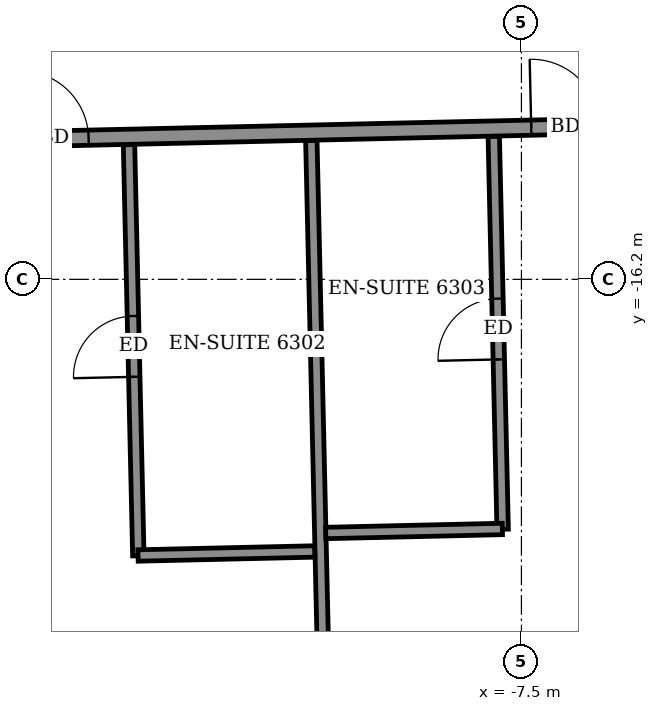
"""IFC4 building model, lengths in metres.
Left out: names, types, materials, properties, quantities, classifications, styles, units other than length and angle.
Written with IfcOpenShell. Run it as: python <this file> out.ifc"""

import sys

from ifc_helpers import new_model, si_unit, direction, frame, frame_2d, origin, place, context, subcontext, project, spatial, rectangle, extrude, element, fill, save


model = new_model("IFC4")
c1 = context("Model", 3, precision=1e-05, world=origin(), true_north=direction((0.0, 1.0)))
c2 = subcontext(c1, "Body", "Model", "MODEL_VIEW")
j1 = project(units=[si_unit("LENGTHUNIT", "METRE"), si_unit("PLANEANGLEUNIT", "RADIAN")], contexts=[c1])
p1 = place(None, origin())
s1 = spatial("IfcSite", under=j1, at=p1, CompositionType="ELEMENT")
p2 = place(p1, origin())
s2 = spatial("IfcBuilding", under=s1, at=p2, CompositionType="ELEMENT")
p3 = place(p2, frame((0.0, 0.0, 249.1)))
s3 = spatial("IfcBuildingStorey", under=s2, at=p3, CompositionType="ELEMENT", Elevation=249.1)
p4 = place(p3, frame((-10.005, -25.747, 0.0), z_axis=(0.0, 0.0, 1.0), x_axis=(-0.022770155219, 0.999740726404, 0.0)))
e1 = element("IfcWall", 1, at=p4, inside=s3, PredefinedType="PARTITIONING", context=c2, shape_type="SweptSolid", body=[
    extrude(rectangle(XDim=11.376, YDim=0.15, at=frame_2d((5.688, 0.0))), origin(), (0.0, 0.0, 1.0), 2.5),
])
p5 = place(p3, frame((-12.54, -19.837, 0.0), z_axis=(0.0, 0.0, 1.0), x_axis=(-0.022742931096, 0.999741346092, 0.0)))
e2 = element("IfcWall", 2, at=p5, inside=s3, PredefinedType="PARTITIONING", context=c2, shape_type="SweptSolid", body=[
    extrude(rectangle(XDim=5.41, YDim=0.15, at=frame_2d((2.705, 0.0))), origin(), (0.0, 0.0, 1.0), 3.05),
])
p6 = place(p5, frame((2.355, 0.0, 0.0)))
e3 = element("IfcOpeningElement", 3, at=p6, cuts=e2, PredefinedType="OPENING", context=c2, shape_type="SweptSolid", body=[
    extrude(rectangle(XDim=0.8, YDim=2.1, at=frame_2d((0.4, 1.05))), frame((0.0, 0.085, 0.0), z_axis=(0.0, -1.0, 0.0), x_axis=(1.0, 0.0, 0.0)), (0.0, 0.0, 1.0), 0.17),
])
p7 = place(p3, frame((-12.544, -19.833, 0.0), z_axis=(0.0, 0.0, 1.0), x_axis=(0.999740260747, 0.02279059109, 0.0)))
e4 = element("IfcWall", 4, at=p7, inside=s3, PredefinedType="PARTITIONING", context=c2, shape_type="SweptSolid", body=[
    extrude(rectangle(XDim=2.324, YDim=0.15, at=frame_2d((1.162, 0.0))), origin(), (0.0, 0.0, 1.0), 3.05),
])
p8 = place(p3, frame((-7.747, -19.488, 0.0), z_axis=(0.0, 0.0, 1.0), x_axis=(-0.022618432726, 0.999744170526, 0.0)))
e5 = element("IfcWall", 5, at=p8, inside=s3, PredefinedType="PARTITIONING", context=c2, shape_type="SweptSolid", body=[
    extrude(rectangle(XDim=5.17, YDim=0.15, at=frame_2d((2.585, 0.0))), origin(), (0.0, 0.0, 1.0), 3.05),
])
p9 = place(p8, frame((2.235, 0.0, 0.0)))
e6 = element("IfcOpeningElement", 6, at=p9, cuts=e5, PredefinedType="OPENING", context=c2, shape_type="SweptSolid", body=[
    extrude(rectangle(XDim=0.8, YDim=2.1, at=frame_2d((0.4, 1.05))), frame((0.0, 0.085, 0.0), z_axis=(0.0, -1.0, 0.0), x_axis=(1.0, 0.0, 0.0)), (0.0, 0.0, 1.0), 0.17),
])
p10 = place(p3, frame((-10.075, -19.537, 0.0), z_axis=(0.0, 0.0, 1.0), x_axis=(0.999737862264, 0.022895561926, 0.0)))
e7 = element("IfcWall", 7, at=p10, inside=s3, PredefinedType="PARTITIONING", context=c2, shape_type="SweptSolid", body=[
    extrude(rectangle(XDim=2.324, YDim=0.15, at=frame_2d((1.162, 0.0))), origin(), (0.0, 0.0, 1.0), 3.05),
])
p11 = place(p3, frame((-27.016, -14.65, 0.0), z_axis=(0.0, 0.0, 1.0), x_axis=(0.999742874861, 0.022675629315, 0.0)))
e8 = element("IfcWall", 8, at=p11, inside=s3, PredefinedType="PARTITIONING", context=c2, shape_type="SweptSolid", body=[
    extrude(rectangle(XDim=50.883, YDim=0.2, at=frame_2d((25.442, 0.0))), origin(), (0.0, 0.0, 1.0), 3.05),
])
p12 = place(p11, frame((1.575, 0.0, 0.0)))
e9 = element("IfcOpeningElement", 9, at=p12, cuts=e8, PredefinedType="OPENING", context=c2, shape_type="SweptSolid", body=[
    extrude(rectangle(XDim=1.0, YDim=2.1, at=frame_2d((0.5, 1.05))), frame((0.0, 0.11, 0.0), z_axis=(0.0, -1.0, 0.0), x_axis=(1.0, 0.0, 0.0)), (0.0, 0.0, 1.0), 0.22),
])
p13 = place(p11, frame((6.4, 0.0, 0.0)))
e10 = element("IfcOpeningElement", 10, at=p13, cuts=e8, PredefinedType="OPENING", context=c2, shape_type="SweptSolid", body=[
    extrude(rectangle(XDim=0.9, YDim=2.1, at=frame_2d((0.45, 1.05))), frame((0.0, 0.11, 0.0), z_axis=(0.0, -1.0, 0.0), x_axis=(1.0, 0.0, 0.0)), (0.0, 0.0, 1.0), 0.22),
])
p14 = place(p11, frame((11.025, 0.0, 0.0)))
e11 = element("IfcOpeningElement", 11, at=p14, cuts=e8, PredefinedType="OPENING", context=c2, shape_type="SweptSolid", body=[
    extrude(rectangle(XDim=0.9, YDim=2.1, at=frame_2d((0.45, 1.05))), frame((0.0, 0.11, 0.0), z_axis=(0.0, -1.0, 0.0), x_axis=(1.0, 0.0, 0.0)), (0.0, 0.0, 1.0), 0.22),
])
p15 = place(p11, frame((12.925, 0.0, 0.0)))
e12 = element("IfcOpeningElement", 12, at=p15, cuts=e8, PredefinedType="OPENING", context=c2, shape_type="SweptSolid", body=[
    extrude(rectangle(XDim=0.9, YDim=2.1, at=frame_2d((0.45, 1.05))), frame((0.0, 0.11, 0.0), z_axis=(0.0, -1.0, 0.0), x_axis=(1.0, 0.0, 0.0)), (0.0, 0.0, 1.0), 0.22),
])
p16 = place(p11, frame((19.65, 0.0, 0.0)))
e13 = element("IfcOpeningElement", 13, at=p16, cuts=e8, PredefinedType="OPENING", context=c2, shape_type="SweptSolid", body=[
    extrude(rectangle(XDim=0.9, YDim=2.1, at=frame_2d((0.45, 1.05))), frame((0.0, 0.11, 0.0), z_axis=(0.0, -1.0, 0.0), x_axis=(1.0, 0.0, 0.0)), (0.0, 0.0, 1.0), 0.22),
])
p17 = place(p11, frame((21.575, 0.0, 0.0)))
e14 = element("IfcOpeningElement", 14, at=p17, cuts=e8, PredefinedType="OPENING", context=c2, shape_type="SweptSolid", body=[
    extrude(rectangle(XDim=0.9, YDim=2.1, at=frame_2d((0.45, 1.05))), frame((0.0, 0.11, 0.0), z_axis=(0.0, -1.0, 0.0), x_axis=(1.0, 0.0, 0.0)), (0.0, 0.0, 1.0), 0.22),
])
p18 = place(p11, frame((28.25, 0.0, 0.0)))
e15 = element("IfcOpeningElement", 15, at=p18, cuts=e8, PredefinedType="OPENING", context=c2, shape_type="SweptSolid", body=[
    extrude(rectangle(XDim=0.9, YDim=2.1, at=frame_2d((0.45, 1.05))), frame((0.0, 0.11, 0.0), z_axis=(0.0, -1.0, 0.0), x_axis=(1.0, 0.0, 0.0)), (0.0, 0.0, 1.0), 0.22),
])
p19 = place(p11, frame((30.125, 0.0, 0.0)))
e16 = element("IfcOpeningElement", 16, at=p19, cuts=e8, PredefinedType="OPENING", context=c2, shape_type="SweptSolid", body=[
    extrude(rectangle(XDim=0.9, YDim=2.1, at=frame_2d((0.45, 1.05))), frame((0.0, 0.11, 0.0), z_axis=(0.0, -1.0, 0.0), x_axis=(1.0, 0.0, 0.0)), (0.0, 0.0, 1.0), 0.22),
])
p20 = place(p11, frame((36.9, 0.0, 0.0)))
e17 = element("IfcOpeningElement", 17, at=p20, cuts=e8, PredefinedType="OPENING", context=c2, shape_type="SweptSolid", body=[
    extrude(rectangle(XDim=0.9, YDim=2.1, at=frame_2d((0.45, 1.05))), frame((0.0, 0.11, 0.0), z_axis=(0.0, -1.0, 0.0), x_axis=(1.0, 0.0, 0.0)), (0.0, 0.0, 1.0), 0.22),
])
p21 = place(p11, frame((38.85, 0.0, 0.0)))
e18 = element("IfcOpeningElement", 18, at=p21, cuts=e8, PredefinedType="OPENING", context=c2, shape_type="SweptSolid", body=[
    extrude(rectangle(XDim=0.9, YDim=2.1, at=frame_2d((0.45, 1.05))), frame((0.0, 0.11, 0.0), z_axis=(0.0, -1.0, 0.0), x_axis=(1.0, 0.0, 0.0)), (0.0, 0.0, 1.0), 0.22),
])
p22 = place(p11, frame((48.629, 0.0, 0.0)))
e19 = element("IfcOpeningElement", 19, at=p22, cuts=e8, PredefinedType="OPENING", context=c2, shape_type="SweptSolid", body=[
    extrude(rectangle(XDim=1.0, YDim=2.1, at=frame_2d((0.5, 1.05))), frame((0.0, 0.11, 0.0), z_axis=(0.0, -1.0, 0.0), x_axis=(1.0, 0.0, 0.0)), (0.0, 0.0, 1.0), 0.22),
])
p23 = place(p11, frame((43.6, 0.0, 0.0)))
e20 = element("IfcOpeningElement", 20, at=p23, cuts=e8, PredefinedType="OPENING", context=c2, shape_type="SweptSolid", body=[
    extrude(rectangle(XDim=0.9, YDim=2.1, at=frame_2d((0.45, 1.05))), frame((0.0, 0.11, 0.0), z_axis=(0.0, -1.0, 0.0), x_axis=(1.0, 0.0, 0.0)), (0.0, 0.0, 1.0), 0.22),
])
p24 = place(p15, origin())
e21 = element("IfcDoor", 21, at=p24, inside=s3, OperationType="SINGLE_SWING_RIGHT", PredefinedType="DOOR", context=c2, shape_type="SweptSolid", body=[
    extrude(rectangle(XDim=0.9, YDim=2.1, at=frame_2d((0.45, 1.05))), frame((0.0, 0.025, 0.0), z_axis=(0.0, -1.0, 0.0), x_axis=(1.0, 0.0, 0.0)), (0.0, 0.0, 1.0), 0.05),
])
fill(e12, e21)
p25 = place(p6, origin())
e22 = element("IfcDoor", 22, at=p25, inside=s3, OperationType="SINGLE_SWING_RIGHT", PredefinedType="DOOR", context=c2, shape_type="SweptSolid", body=[
    extrude(rectangle(XDim=0.8, YDim=2.1, at=frame_2d((0.4, 1.05))), frame((0.0, 0.025, 0.0), z_axis=(0.0, -1.0, 0.0), x_axis=(1.0, 0.0, 0.0)), (0.0, 0.0, 1.0), 0.05),
])
fill(e3, e22)
p26 = place(p16, origin())
e23 = element("IfcDoor", 23, at=p26, inside=s3, OperationType="SINGLE_SWING_LEFT", PredefinedType="DOOR", context=c2, shape_type="SweptSolid", body=[
    extrude(rectangle(XDim=0.9, YDim=2.1, at=frame_2d((0.45, 1.05))), frame((0.0, 0.025, 0.0), z_axis=(0.0, -1.0, 0.0), x_axis=(1.0, 0.0, 0.0)), (0.0, 0.0, 1.0), 0.05),
])
fill(e13, e23)
p27 = place(p9, origin())
e24 = element("IfcDoor", 24, at=p27, inside=s3, OperationType="SINGLE_SWING_LEFT", PredefinedType="DOOR", context=c2, shape_type="SweptSolid", body=[
    extrude(rectangle(XDim=0.8, YDim=2.1, at=frame_2d((0.4, 1.05))), frame((0.0, 0.025, 0.0), z_axis=(0.0, -1.0, 0.0), x_axis=(1.0, 0.0, 0.0)), (0.0, 0.0, 1.0), 0.05),
])
fill(e6, e24)
save(model, sys.argv[1])
